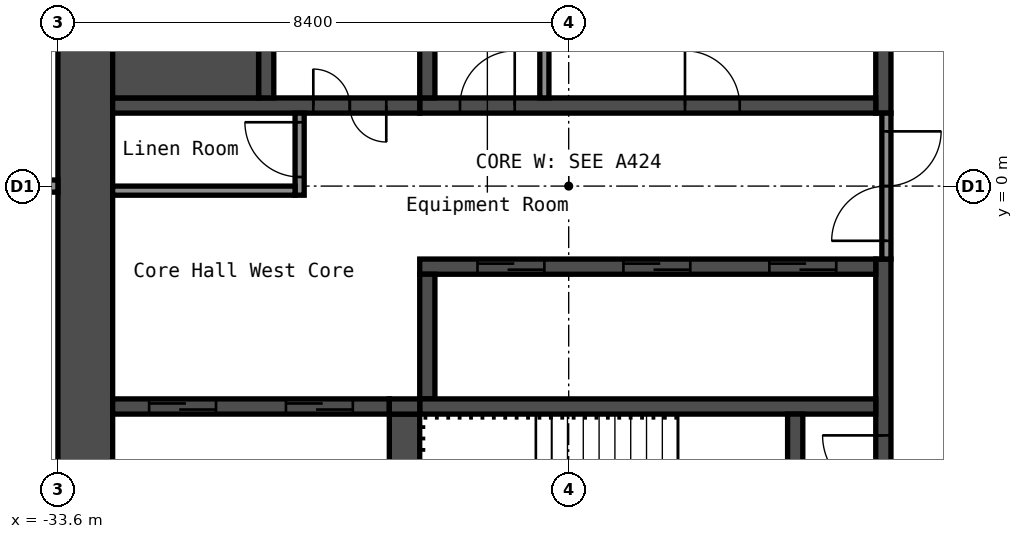
"""IFC4 building model, lengths in metres.
Left out: names, types, materials, properties, quantities, classifications, styles, units other than length and angle.
Written with IfcOpenShell. Run it as: python <this file> out.ifc"""

import sys

from ifc_helpers import new_model, si_unit, direction, frame, frame_2d, origin, place, context, subcontext, project, spatial, rectangle, extrude, element, fill, save


model = new_model("IFC4")
c1 = context("Model", 3, precision=1e-05, world=origin(), true_north=direction((0.0, 1.0)))
c2 = subcontext(c1, "Body", "Model", "MODEL_VIEW")
j1 = project(units=[si_unit("LENGTHUNIT", "METRE"), si_unit("PLANEANGLEUNIT", "RADIAN")], contexts=[c1])
p1 = place(None, origin())
s1 = spatial("IfcSite", under=j1, at=p1, CompositionType="ELEMENT")
p2 = place(p1, origin())
s2 = spatial("IfcBuilding", under=s1, at=p2, CompositionType="ELEMENT")
p3 = place(p2, frame((0.0, 0.0, 169.4)))
s3 = spatial("IfcBuildingStorey", under=s2, at=p3, CompositionType="ELEMENT", Elevation=169.4)
p4 = place(p3, frame((-33.15, -8.4, 0.0), z_axis=(0.0, 0.0, 1.0), x_axis=(0.0, 1.0, 0.0)))
e1 = element("IfcWall", 1, at=p4, inside=s3, PredefinedType="SHEAR", context=c2, shape_type="SweptSolid", body=[
    extrude(rectangle(XDim=16.8, YDim=0.9, at=frame_2d((8.4, 0.0))), origin(), (0.0, 0.0, 1.0), 2.75),
])
p5 = place(p3, frame((-20.025, 1.2, 0.0), z_axis=(0.0, 0.0, 1.0), x_axis=(0.0, 1.0, 0.0)))
e2 = element("IfcWall", 2, at=p5, inside=s3, PredefinedType="SHEAR", context=c2, shape_type="SweptSolid", body=[
    extrude(rectangle(XDim=6.3, YDim=0.25, at=frame_2d((3.15, 0.0))), origin(), (0.0, 0.0, 1.0), 2.75),
])
p6 = place(p3, frame((-20.025, -7.5, 0.0), z_axis=(0.0, 0.0, 1.0), x_axis=(0.0, 1.0, 0.0)))
e3 = element("IfcWall", 3, at=p6, inside=s3, PredefinedType="SHEAR", context=c2, shape_type="SweptSolid", body=[
    extrude(rectangle(XDim=6.3, YDim=0.25, at=frame_2d((3.15, 0.0))), origin(), (0.0, 0.0, 1.0), 2.75),
])
p7 = place(p6, frame((2.4, 0.0, 0.0)))
e4 = element("IfcOpeningElement", 4, at=p7, cuts=e3, PredefinedType="OPENING", context=c2, shape_type="SweptSolid", body=[
    extrude(rectangle(XDim=1.0, YDim=2.1, at=frame_2d((0.5, 1.05))), frame((0.0, 0.135, 0.0), z_axis=(0.0, -1.0, 0.0), x_axis=(1.0, 0.0, 0.0)), (0.0, 0.0, 1.0), 0.27),
])
p8 = place(p3, frame((-27.65, 1.325, 0.0), z_axis=(0.0, 0.0, 1.0), x_axis=(1.0, 0.0, 0.0)))
e5 = element("IfcWall", 5, at=p8, inside=s3, PredefinedType="SHEAR", context=c2, shape_type="SweptSolid", body=[
    extrude(rectangle(XDim=7.5, YDim=0.25, at=frame_2d((3.75, 0.0))), origin(), (0.0, 0.0, 1.0), 2.75),
])
p9 = place(p8, frame((4.363, 0.0, 0.0)))
e6 = element("IfcOpeningElement", 6, at=p9, cuts=e5, PredefinedType="OPENING", context=c2, shape_type="SweptSolid", body=[
    extrude(rectangle(XDim=0.9, YDim=2.1, at=frame_2d((0.45, 1.05))), frame((0.0, 0.135, 0.0), z_axis=(0.0, -1.0, 0.0), x_axis=(1.0, 0.0, 0.0)), (0.0, 0.0, 1.0), 0.27),
])
p10 = place(p8, frame((0.663, 0.0, 0.0)))
e7 = element("IfcOpeningElement", 7, at=p10, cuts=e5, PredefinedType="OPENING", context=c2, shape_type="SweptSolid", body=[
    extrude(rectangle(XDim=0.9, YDim=2.1, at=frame_2d((0.45, 1.05))), frame((0.0, 0.135, 0.0), z_axis=(0.0, -1.0, 0.0), x_axis=(1.0, 0.0, 0.0)), (0.0, 0.0, 1.0), 0.27),
])
p11 = place(p3, frame((-27.525, 1.45, 0.0), z_axis=(0.0, 0.0, 1.0), x_axis=(0.0, 1.0, 0.0)))
e8 = element("IfcWall", 8, at=p11, inside=s3, PredefinedType="SHEAR", context=c2, shape_type="SweptSolid", body=[
    extrude(rectangle(XDim=2.05, YDim=0.25, at=frame_2d((1.025, 0.0))), origin(), (0.0, 0.0, 1.0), 2.75),
])
p12 = place(p3, frame((-32.7, 1.325, 0.0), z_axis=(0.0, 0.0, 1.0), x_axis=(1.0, 0.0, 0.0)))
e9 = element("IfcWall", 9, at=p12, inside=s3, PredefinedType="SHEAR", context=c2, shape_type="SweptSolid", body=[
    extrude(rectangle(XDim=5.05, YDim=0.25, at=frame_2d((2.525, 0.0))), origin(), (0.0, 0.0, 1.0), 2.75),
])
p13 = place(p12, frame((3.3, 0.0, 0.0)))
e10 = element("IfcOpeningElement", 10, at=p13, cuts=e9, PredefinedType="OPENING", context=c2, shape_type="SweptSolid", body=[
    extrude(rectangle(XDim=1.2, YDim=2.1, at=frame_2d((0.6, 1.05))), frame((0.0, 0.135, 0.0), z_axis=(0.0, -1.0, 0.0), x_axis=(1.0, 0.0, 0.0)), (0.0, 0.0, 1.0), 0.27),
])
p14 = place(p3, frame((-30.175, 1.45, 0.0), z_axis=(0.0, 0.0, 1.0), x_axis=(0.0, 1.0, 0.0)))
e11 = element("IfcWall", 11, at=p14, inside=s3, PredefinedType="SHEAR", context=c2, shape_type="SweptSolid", body=[
    extrude(rectangle(XDim=6.05, YDim=0.25, at=frame_2d((3.025, 0.0))), origin(), (0.0, 0.0, 1.0), 2.75),
])
p15 = place(p14, frame((2.625, 0.0, 0.0)))
e12 = element("IfcOpeningElement", 12, at=p15, cuts=e11, PredefinedType="OPENING", context=c2, shape_type="SweptSolid", body=[
    extrude(rectangle(XDim=1.1, YDim=2.1, at=frame_2d((0.55, 1.05))), frame((0.0, 0.135, 0.0), z_axis=(0.0, -1.0, 0.0), x_axis=(1.0, 0.0, 0.0)), (0.0, 0.0, 1.0), 0.27),
])
p16 = place(p3, frame((-32.7, 2.375, 0.0), z_axis=(0.0, 0.0, 1.0), x_axis=(1.0, 0.0, 0.0)))
e13 = element("IfcWall", 13, at=p16, inside=s3, PredefinedType="SHEAR", context=c2, shape_type="SweptSolid", body=[
    extrude(rectangle(XDim=2.4, YDim=1.85, at=frame_2d((1.2, 0.0))), origin(), (0.0, 0.0, 1.0), 2.75),
])
p17 = place(p3, frame((-27.65, -1.325, 0.0), z_axis=(0.0, 0.0, 1.0), x_axis=(1.0, 0.0, 0.0)))
e14 = element("IfcWall", 14, at=p17, inside=s3, PredefinedType="SHEAR", context=c2, shape_type="SweptSolid", body=[
    extrude(rectangle(XDim=7.5, YDim=0.25, at=frame_2d((3.75, 0.0))), origin(), (0.0, 0.0, 1.0), 2.75),
])
p18 = place(p17, frame((5.75, 0.0, 0.0)))
e15 = element("IfcOpeningElement", 15, at=p18, cuts=e14, PredefinedType="OPENING", context=c2, shape_type="SweptSolid", body=[
    extrude(rectangle(XDim=1.1, YDim=2.1, at=frame_2d((0.55, 1.05))), frame((0.0, 0.135, 0.0), z_axis=(0.0, -1.0, 0.0), x_axis=(1.0, 0.0, 0.0)), (0.0, 0.0, 1.0), 0.27),
])
p19 = place(p17, frame((3.35, 0.0, 0.0)))
e16 = element("IfcOpeningElement", 16, at=p19, cuts=e14, PredefinedType="OPENING", context=c2, shape_type="SweptSolid", body=[
    extrude(rectangle(XDim=1.1, YDim=2.1, at=frame_2d((0.55, 1.05))), frame((0.0, 0.135, 0.0), z_axis=(0.0, -1.0, 0.0), x_axis=(1.0, 0.0, 0.0)), (0.0, 0.0, 1.0), 0.27),
])
p20 = place(p17, frame((0.95, 0.0, 0.0)))
e17 = element("IfcOpeningElement", 17, at=p20, cuts=e14, PredefinedType="OPENING", context=c2, shape_type="SweptSolid", body=[
    extrude(rectangle(XDim=1.1, YDim=2.1, at=frame_2d((0.55, 1.05))), frame((0.0, 0.135, 0.0), z_axis=(0.0, -1.0, 0.0), x_axis=(1.0, 0.0, 0.0)), (0.0, 0.0, 1.0), 0.27),
])
p21 = place(p3, frame((-27.525, -3.5, 0.0), z_axis=(0.0, 0.0, 1.0), x_axis=(0.0, 1.0, 0.0)))
e18 = element("IfcWall", 18, at=p21, inside=s3, PredefinedType="SHEAR", context=c2, shape_type="SweptSolid", body=[
    extrude(rectangle(XDim=2.05, YDim=0.25, at=frame_2d((1.025, 0.0))), origin(), (0.0, 0.0, 1.0), 2.75),
])
p22 = place(p3, frame((-27.65, -3.625, 0.0), z_axis=(0.0, 0.0, 1.0), x_axis=(1.0, 0.0, 0.0)))
e19 = element("IfcWall", 19, at=p22, inside=s3, PredefinedType="SHEAR", context=c2, shape_type="SweptSolid", body=[
    extrude(rectangle(XDim=7.5, YDim=0.25, at=frame_2d((3.75, 0.0))), origin(), (0.0, 0.0, 1.0), 2.75),
])
p23 = place(p3, frame((-21.475, -7.5, 0.0), z_axis=(0.0, 0.0, 1.0), x_axis=(0.0, 1.0, 0.0)))
e20 = element("IfcWall", 20, at=p23, inside=s3, PredefinedType="SHEAR", context=c2, shape_type="SweptSolid", body=[
    extrude(rectangle(XDim=3.75, YDim=0.25, at=frame_2d((1.875, 0.0))), origin(), (0.0, 0.0, 1.0), 2.75),
])
p24 = place(p23, frame((1.3, 0.0, 0.0)))
e21 = element("IfcOpeningElement", 21, at=p24, cuts=e20, PredefinedType="OPENING", context=c2, shape_type="SweptSolid", body=[
    extrude(rectangle(XDim=1.2, YDim=2.1, at=frame_2d((0.6, 1.05))), frame((0.0, 0.135, 0.0), z_axis=(0.0, -1.0, 0.0), x_axis=(1.0, 0.0, 0.0)), (0.0, 0.0, 1.0), 0.27),
])
p25 = place(p3, frame((-27.9, -7.5, 0.0), z_axis=(0.0, 0.0, 1.0), x_axis=(0.0, 1.0, 0.0)))
e22 = element("IfcWall", 22, at=p25, inside=s3, PredefinedType="SHEAR", context=c2, shape_type="SweptSolid", body=[
    extrude(rectangle(XDim=3.75, YDim=0.5, at=frame_2d((1.875, 0.0))), origin(), (0.0, 0.0, 1.0), 2.75),
])
p26 = place(p3, frame((-32.7, -3.625, 0.0), z_axis=(0.0, 0.0, 1.0), x_axis=(1.0, 0.0, 0.0)))
e23 = element("IfcWall", 23, at=p26, inside=s3, PredefinedType="SHEAR", context=c2, shape_type="SweptSolid", body=[
    extrude(rectangle(XDim=4.55, YDim=0.25, at=frame_2d((2.275, 0.0))), origin(), (0.0, 0.0, 1.0), 2.75),
])
p27 = place(p26, frame((2.85, 0.0, 0.0)))
e24 = element("IfcOpeningElement", 24, at=p27, cuts=e23, PredefinedType="OPENING", context=c2, shape_type="SweptSolid", body=[
    extrude(rectangle(XDim=1.1, YDim=2.1, at=frame_2d((0.55, 1.05))), frame((0.0, 0.135, 0.0), z_axis=(0.0, -1.0, 0.0), x_axis=(1.0, 0.0, 0.0)), (0.0, 0.0, 1.0), 0.27),
])
p28 = place(p26, frame((0.6, 0.0, 0.0)))
e25 = element("IfcOpeningElement", 25, at=p28, cuts=e23, PredefinedType="OPENING", context=c2, shape_type="SweptSolid", body=[
    extrude(rectangle(XDim=1.1, YDim=2.1, at=frame_2d((0.55, 1.05))), frame((0.0, 0.135, 0.0), z_axis=(0.0, -1.0, 0.0), x_axis=(1.0, 0.0, 0.0)), (0.0, 0.0, 1.0), 0.27),
])
p29 = place(p3, frame((-28.15, -3.625, 0.0), z_axis=(0.0, 0.0, 1.0), x_axis=(1.0, 0.0, 0.0)))
e26 = element("IfcWall", 26, at=p29, inside=s3, PredefinedType="SHEAR", context=c2, shape_type="SweptSolid", body=[
    extrude(rectangle(XDim=0.5, YDim=0.25, at=frame_2d((0.25, 0.0))), origin(), (0.0, 0.0, 1.0), 2.75),
])
p30 = place(p3, frame((-19.975, -1.2, 0.0), z_axis=(0.0, 0.0, 1.0), x_axis=(0.0, 1.0, 0.0)))
e27 = element("IfcWall", 27, at=p30, inside=s3, PredefinedType="PARTITIONING", context=c2, shape_type="SweptSolid", body=[
    extrude(rectangle(XDim=2.4, YDim=0.15, at=frame_2d((1.2, 0.0))), origin(), (0.0, 0.0, 1.0), 2.75),
])
p31 = place(p30, frame((0.3, 0.0, 0.0)))
e28 = element("IfcOpeningElement", 28, at=p31, cuts=e27, PredefinedType="OPENING", context=c2, shape_type="SweptSolid", body=[
    extrude(rectangle(XDim=1.8, YDim=2.1, at=frame_2d((0.9, 1.05))), frame((0.0, 0.085, 0.0), z_axis=(0.0, -1.0, 0.0), x_axis=(1.0, 0.0, 0.0)), (0.0, 0.0, 1.0), 0.17),
])
p32 = place(p3, frame((-29.625, -0.15, 0.0), z_axis=(0.0, 0.0, 1.0), x_axis=(0.0, 1.0, 0.0)))
e29 = element("IfcWall", 29, at=p32, inside=s3, PredefinedType="PARTITIONING", context=c2, shape_type="SweptSolid", body=[
    extrude(rectangle(XDim=1.35, YDim=0.15, at=frame_2d((0.675, 0.0))), origin(), (0.0, 0.0, 1.0), 2.75),
])
p33 = place(p32, frame((0.3, 0.0, 0.0)))
e30 = element("IfcOpeningElement", 30, at=p33, cuts=e29, PredefinedType="OPENING", context=c2, shape_type="SweptSolid", body=[
    extrude(rectangle(XDim=0.9, YDim=2.1, at=frame_2d((0.45, 1.05))), frame((0.0, 0.085, 0.0), z_axis=(0.0, -1.0, 0.0), x_axis=(1.0, 0.0, 0.0)), (0.0, 0.0, 1.0), 0.17),
])
p34 = place(p3, frame((-32.7, -0.075, 0.0), z_axis=(0.0, 0.0, 1.0), x_axis=(1.0, 0.0, 0.0)))
e31 = element("IfcWall", 31, at=p34, inside=s3, PredefinedType="PARTITIONING", context=c2, shape_type="SweptSolid", body=[
    extrude(rectangle(XDim=3.0, YDim=0.15, at=frame_2d((1.5, 0.0))), origin(), (0.0, 0.0, 1.0), 2.75),
])
p35 = place(p3, frame((-25.6, 1.45, 0.0), z_axis=(0.0, 0.0, 1.0), x_axis=(0.0, 1.0, 0.0)))
e32 = element("IfcWall", 32, at=p35, inside=s3, PredefinedType="PARTITIONING", context=c2, shape_type="SweptSolid", body=[
    extrude(rectangle(XDim=2.05, YDim=0.15, at=frame_2d((1.025, 0.0))), origin(), (0.0, 0.0, 1.0), 2.75),
])
p36 = place(p3, frame((-40.1, 0.0, 0.0), z_axis=(0.0, 0.0, 1.0), x_axis=(1.0, 0.0, 0.0)))
e33 = element("IfcWall", 33, at=p36, inside=s3, PredefinedType="PARTITIONING", context=c2, shape_type="SweptSolid", body=[
    extrude(rectangle(XDim=6.5, YDim=0.2, at=frame_2d((3.25, 0.0))), origin(), (0.0, 0.0, 1.0), 2.75),
])
p37 = place(p7, origin())
e34 = element("IfcDoor", 34, at=p37, inside=s3, OperationType="SINGLE_SWING_LEFT", PredefinedType="DOOR", context=c2, shape_type="SweptSolid", body=[
    extrude(rectangle(XDim=1.0, YDim=2.1, at=frame_2d((0.5, 1.05))), frame((0.0, 0.025, 0.0), z_axis=(0.0, -1.0, 0.0), x_axis=(1.0, 0.0, 0.0)), (0.0, 0.0, 1.0), 0.05),
])
fill(e4, e34)
p38 = place(p13, origin())
e35 = element("IfcDoor", 35, at=p38, inside=s3, OperationType="DOUBLE_DOOR_SINGLE_SWING", PredefinedType="DOOR", context=c2, shape_type="SweptSolid", body=[
    extrude(rectangle(XDim=1.2, YDim=2.1, at=frame_2d((0.6, 1.05))), frame((0.0, 0.025, 0.0), z_axis=(0.0, -1.0, 0.0), x_axis=(1.0, 0.0, 0.0)), (0.0, 0.0, 1.0), 0.05),
])
fill(e10, e35)
p39 = place(p31, origin())
e36 = element("IfcDoor", 36, at=p39, inside=s3, OperationType="DOUBLE_DOOR_SINGLE_SWING", PredefinedType="DOOR", context=c2, shape_type="SweptSolid", body=[
    extrude(rectangle(XDim=1.8, YDim=2.1, at=frame_2d((0.9, 1.05))), frame((0.0, 0.025, 0.0), z_axis=(0.0, -1.0, 0.0), x_axis=(1.0, 0.0, 0.0)), (0.0, 0.0, 1.0), 0.05),
])
fill(e28, e36)
p40 = place(p33, origin())
e37 = element("IfcDoor", 37, at=p40, inside=s3, OperationType="SINGLE_SWING_LEFT", PredefinedType="DOOR", context=c2, shape_type="SweptSolid", body=[
    extrude(rectangle(XDim=0.9, YDim=2.1, at=frame_2d((0.45, 1.05))), frame((0.0, 0.025, 0.0), z_axis=(0.0, -1.0, 0.0), x_axis=(1.0, 0.0, 0.0)), (0.0, 0.0, 1.0), 0.05),
])
fill(e30, e37)
p41 = place(p9, origin())
e38 = element("IfcDoor", 38, at=p41, inside=s3, OperationType="SINGLE_SWING_RIGHT", PredefinedType="DOOR", context=c2, shape_type="SweptSolid", body=[
    extrude(rectangle(XDim=0.9, YDim=2.1, at=frame_2d((0.45, 1.05))), frame((0.0, 0.025, 0.0), z_axis=(0.0, -1.0, 0.0), x_axis=(1.0, 0.0, 0.0)), (0.0, 0.0, 1.0), 0.05),
])
fill(e6, e38)
p42 = place(p10, origin())
e39 = element("IfcDoor", 39, at=p42, inside=s3, OperationType="SINGLE_SWING_LEFT", PredefinedType="DOOR", context=c2, shape_type="SweptSolid", body=[
    extrude(rectangle(XDim=0.9, YDim=2.1, at=frame_2d((0.45, 1.05))), frame((0.0, 0.025, 0.0), z_axis=(0.0, -1.0, 0.0), x_axis=(1.0, 0.0, 0.0)), (0.0, 0.0, 1.0), 0.05),
])
fill(e7, e39)
p43 = place(p18, origin())
e40 = element("IfcDoor", 40, at=p43, inside=s3, OperationType="DOUBLE_DOOR_SLIDING", PredefinedType="DOOR", context=c2, shape_type="SweptSolid", body=[
    extrude(rectangle(XDim=1.1, YDim=2.1, at=frame_2d((0.55, 1.05))), frame((0.0, 0.025, 0.0), z_axis=(0.0, -1.0, 0.0), x_axis=(1.0, 0.0, 0.0)), (0.0, 0.0, 1.0), 0.05),
])
fill(e15, e40)
p44 = place(p19, origin())
e41 = element("IfcDoor", 41, at=p44, inside=s3, OperationType="DOUBLE_DOOR_SLIDING", PredefinedType="DOOR", context=c2, shape_type="SweptSolid", body=[
    extrude(rectangle(XDim=1.1, YDim=2.1, at=frame_2d((0.55, 1.05))), frame((0.0, 0.025, 0.0), z_axis=(0.0, -1.0, 0.0), x_axis=(1.0, 0.0, 0.0)), (0.0, 0.0, 1.0), 0.05),
])
fill(e16, e41)
p45 = place(p20, origin())
e42 = element("IfcDoor", 42, at=p45, inside=s3, OperationType="DOUBLE_DOOR_SLIDING", PredefinedType="DOOR", context=c2, shape_type="SweptSolid", body=[
    extrude(rectangle(XDim=1.1, YDim=2.1, at=frame_2d((0.55, 1.05))), frame((0.0, 0.025, 0.0), z_axis=(0.0, -1.0, 0.0), x_axis=(1.0, 0.0, 0.0)), (0.0, 0.0, 1.0), 0.05),
])
fill(e17, e42)
p46 = place(p27, origin())
e43 = element("IfcDoor", 43, at=p46, inside=s3, OperationType="DOUBLE_DOOR_SLIDING", PredefinedType="DOOR", context=c2, shape_type="SweptSolid", body=[
    extrude(rectangle(XDim=1.1, YDim=2.1, at=frame_2d((0.55, 1.05))), frame((0.0, 0.025, 0.0), z_axis=(0.0, -1.0, 0.0), x_axis=(1.0, 0.0, 0.0)), (0.0, 0.0, 1.0), 0.05),
])
fill(e24, e43)
p47 = place(p28, origin())
e44 = element("IfcDoor", 44, at=p47, inside=s3, OperationType="DOUBLE_DOOR_SLIDING", PredefinedType="DOOR", context=c2, shape_type="SweptSolid", body=[
    extrude(rectangle(XDim=1.1, YDim=2.1, at=frame_2d((0.55, 1.05))), frame((0.0, 0.025, 0.0), z_axis=(0.0, -1.0, 0.0), x_axis=(1.0, 0.0, 0.0)), (0.0, 0.0, 1.0), 0.05),
])
fill(e25, e44)
save(model, sys.argv[1])
